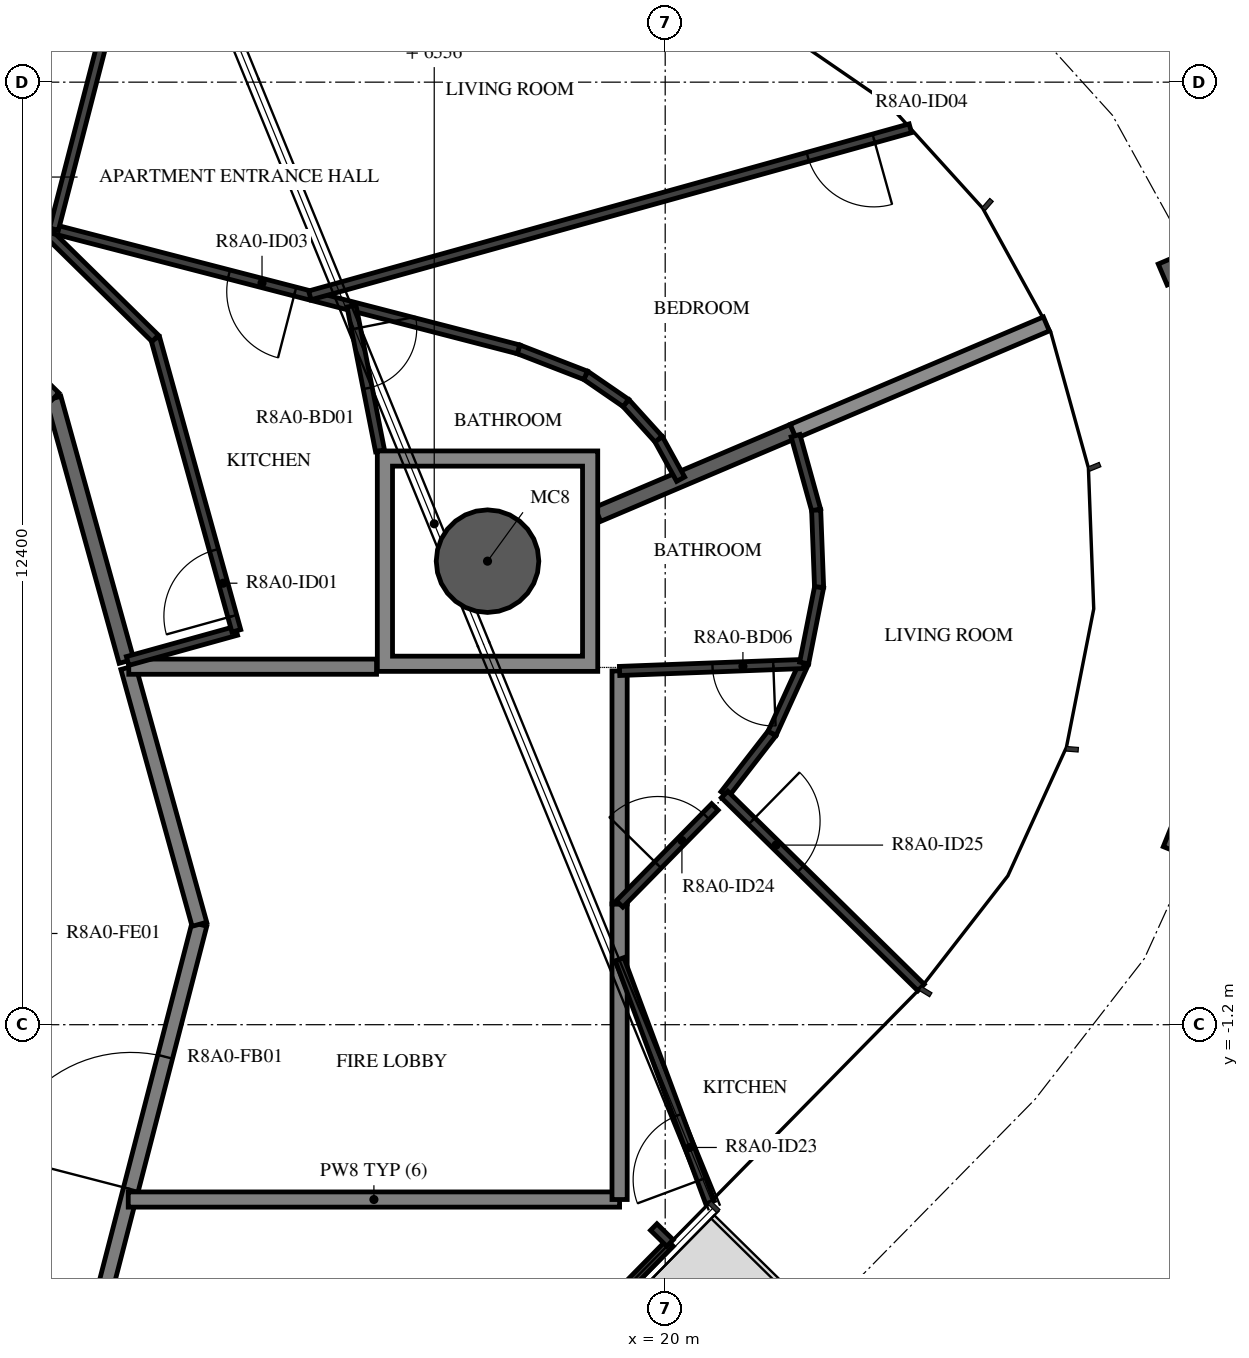
"""IFC4 building model, lengths in metres.
Left out: names, types, materials, properties, quantities, classifications, styles, units other than length and angle.
Written with IfcOpenShell. Run it as: python <this file> out.ifc"""

import sys

from ifc_helpers import new_model, si_unit, direction, frame, frame_2d, origin, origin_2d, place, context, subcontext, project, spatial, polyline, rectangle, hollow_circle, i_section, outline, extrude, element, fill, save


model = new_model("IFC4")
c1 = context("Model", 3, precision=1e-05, world=origin(), true_north=direction((0.0, 1.0)))
c2 = subcontext(c1, "Body", "Model", "MODEL_VIEW")
j1 = project(units=[si_unit("LENGTHUNIT", "METRE"), si_unit("PLANEANGLEUNIT", "RADIAN")], contexts=[c1])
p1 = place(None, origin())
s1 = spatial("IfcSite", under=j1, at=p1, CompositionType="ELEMENT")
p2 = place(p1, origin())
s2 = spatial("IfcBuilding", under=s1, at=p2, CompositionType="ELEMENT")
p3 = place(p2, frame((0.0, 0.0, 305.2)))
s3 = spatial("IfcBuildingStorey", under=s2, at=p3, CompositionType="ELEMENT", Elevation=305.2)
p4 = place(p3, frame((17.663, 4.898, -0.38), z_axis=(0.0, 0.0, 1.0), x_axis=(1.0, 0.0, 0.0)))
e1 = element("IfcColumn", 1, at=p4, inside=s3, PredefinedType="COLUMN", context=c2, shape_type="SweptSolid", body=[
    extrude(hollow_circle(Radius=0.675, WallThickness=0.03, at=origin_2d()), origin(), (0.0, 0.0, 1.0), 3.5),
])
for number, where, z_axis, x_axis in (
    (2, (27.026, 1.113, -0.38), (0.0, 0.0, 1.0), (-0.375, -0.927, 0.0)),
    (3, (26.96, 8.845, -0.38), (0.0, 0.0, 1.0), (0.391, -0.92, 0.0)),
):
    element("IfcColumn", number, at=place(p3, frame(where, z_axis=z_axis, x_axis=x_axis)), inside=s3, PredefinedType="COLUMN", context=c2, shape_type="SweptSolid", body=[
        extrude(i_section(OverallWidth=0.3, OverallDepth=0.9, WebThickness=0.019, FlangeThickness=0.035, FilletRadius=0.03, at=origin_2d()), origin(), (0.0, 0.0, 1.0), 3.5),
    ])
p5 = place(p3, frame((12.074, -6.831, 0.0), z_axis=(0.0, 0.0, 1.0), x_axis=(0.250391063186, 0.968144780225, 0.0)))
e4 = element("IfcWall", 4, at=p5, inside=s3, PredefinedType="STANDARD", context=c2, shape_type="SweptSolid", body=[
    extrude(rectangle(XDim=7.181, YDim=0.2, at=frame_2d((3.591, 0.0))), origin(), (0.0, 0.0, 1.0), 3.12),
])
p6 = place(p5, frame((3.581, 0.0, 0.0)))
e5 = element("IfcOpeningElement", 5, at=p6, cuts=e4, PredefinedType="OPENING", context=c2, shape_type="SweptSolid", body=[
    extrude(rectangle(XDim=1.8, YDim=2.1, at=frame_2d((0.9, 1.05))), frame((0.0, 0.11, 0.0), z_axis=(0.0, -1.0, 0.0), x_axis=(1.0, 0.0, 0.0)), (0.0, 0.0, 1.0), 0.22),
])
p7 = place(p3, frame((13.872, 0.121, 0.0), z_axis=(0.0, 0.0, 1.0), x_axis=(-0.267291928416, 0.963615600228, 0.0)))
e6 = element("IfcWall", 6, at=p7, inside=s3, PredefinedType="STANDARD", context=c2, shape_type="SweptSolid", body=[
    extrude(rectangle(XDim=3.507, YDim=0.2, at=frame_2d((1.753, 0.0))), origin(), (0.0, 0.0, 1.0), 3.12),
])
p8 = place(p3, frame((12.913, 3.581, 0.0), z_axis=(0.0, 0.0, 1.0), x_axis=(-0.267223005422, 0.963634715737, 0.0)))
e7 = element("IfcWall", 7, at=p8, inside=s3, PredefinedType="STANDARD", context=c2, shape_type="SweptSolid", body=[
    extrude(rectangle(XDim=3.591, YDim=0.2, at=frame_2d((1.795, 0.0))), origin(), (0.0, 0.0, 1.0), 3.12),
])
p9 = place(p3, frame((11.953, 7.041, 0.0), z_axis=(0.0, 0.0, 1.0), x_axis=(-0.713250549143, 0.70090916255, 0.0)))
e8 = element("IfcWall", 8, at=p9, inside=s3, PredefinedType="STANDARD", context=c2, shape_type="SweptSolid", body=[
    extrude(rectangle(XDim=7.181, YDim=0.2, at=frame_2d((3.59, 0.0))), origin(), (0.0, 0.0, 1.0), 3.12),
])
p10 = place(p9, frame((2.6, 0.0, 0.0)))
e9 = element("IfcOpeningElement", 9, at=p10, cuts=e8, PredefinedType="OPENING", context=c2, shape_type="SweptSolid", body=[
    extrude(rectangle(XDim=1.0, YDim=2.1, at=frame_2d((0.5, 1.05))), frame((0.0, 0.11, 0.0), z_axis=(0.0, -1.0, 0.0), x_axis=(1.0, 0.0, 0.0)), (0.0, 0.0, 1.0), 0.22),
])
p11 = place(p3, frame((16.203, 3.51, 0.0), z_axis=(0.0, 0.0, 1.0), x_axis=(-1.0, 0.0, 0.0)))
e10 = element("IfcWall", 10, at=p11, inside=s3, PredefinedType="STANDARD", context=c2, shape_type="SweptSolid", body=[
    extrude(rectangle(XDim=3.26, YDim=0.2, at=frame_2d((1.63, 0.0))), origin(), (0.0, 0.0, 1.0), 3.12),
])
p12 = place(p3, frame((12.936, -3.5, 0.0), z_axis=(0.0, 0.0, 1.0), x_axis=(1.0, 0.0, 0.0)))
e11 = element("IfcWall", 11, at=p12, inside=s3, PredefinedType="STANDARD", context=c2, shape_type="SweptSolid", body=[
    extrude(rectangle(XDim=6.464, YDim=0.2, at=frame_2d((3.232, 0.0))), origin(), (0.0, 0.0, 1.0), 3.12),
])
p13 = place(p3, frame((19.4, -3.5, 0.0), z_axis=(0.0, 0.0, 1.0), x_axis=(0.0, 1.0, 0.0)))
e12 = element("IfcWall", 12, at=p13, inside=s3, PredefinedType="STANDARD", context=c2, shape_type="SweptSolid", body=[
    extrude(rectangle(XDim=3.889, YDim=0.2, at=frame_2d((1.944, 0.0))), origin(), (0.0, 0.0, 1.0), 3.12),
])
p14 = place(p3, frame((19.4, 0.389, 0.0), z_axis=(0.0, 0.0, 1.0), x_axis=(0.0, 1.0, 0.0)))
e13 = element("IfcWall", 13, at=p14, inside=s3, PredefinedType="STANDARD", context=c2, shape_type="SweptSolid", body=[
    extrude(rectangle(XDim=3.065, YDim=0.2, at=frame_2d((1.533, 0.0))), origin(), (0.0, 0.0, 1.0), 3.12),
])
p15 = place(p3, frame((19.113, 5.514, 0.0), z_axis=(0.0, 0.0, 1.0), x_axis=(0.92047794988, 0.390794503268, 0.0)))
e14 = element("IfcWall", 14, at=p15, inside=s3, PredefinedType="STANDARD", context=c2, shape_type="SweptSolid", body=[
    extrude(rectangle(XDim=2.793, YDim=0.2, at=frame_2d((1.396, 0.0))), origin(), (0.0, 0.0, 1.0), 3.12),
])
p16 = place(p3, frame((21.684, 6.605, 0.0), z_axis=(0.0, 0.0, 1.0), x_axis=(0.920517820403, 0.390700578859, 0.0)))
e15 = element("IfcWall", 15, at=p16, inside=s3, PredefinedType="STANDARD", context=c2, shape_type="SweptSolid", body=[
    extrude(rectangle(XDim=3.619, YDim=0.2, at=frame_2d((1.809, 0.0))), origin(), (0.0, 0.0, 1.0), 2.73),
])
p17 = place(p3, frame((12.927, 3.585, 0.0), z_axis=(0.0, 0.0, 1.0), x_axis=(0.963616756608, 0.26728775951, 0.0)))
e16 = element("IfcWall", 16, at=p17, inside=s3, PredefinedType="PARTITIONING", context=c2, shape_type="SweptSolid", body=[
    extrude(rectangle(XDim=1.485, YDim=0.12, at=frame_2d((0.743, 0.0))), origin(), (0.0, 0.0, 1.0), 3.12),
])
p18 = place(p3, frame((14.358, 3.982, 0.0), z_axis=(0.0, 0.0, 1.0), x_axis=(-0.267233823916, 0.963631715623, 0.0)))
e17 = element("IfcWall", 17, at=p18, inside=s3, PredefinedType="PARTITIONING", context=c2, shape_type="SweptSolid", body=[
    extrude(rectangle(XDim=3.992, YDim=0.12, at=frame_2d((1.996, 0.0))), origin(), (0.0, 0.0, 1.0), 3.12),
])
p19 = place(p18, frame((0.2, 0.0, 0.0)))
e18 = element("IfcOpeningElement", 18, at=p19, cuts=e17, PredefinedType="OPENING", context=c2, shape_type="SweptSolid", body=[
    extrude(rectangle(XDim=0.9, YDim=2.1, at=frame_2d((0.45, 1.05))), frame((0.0, 0.07, 0.0), z_axis=(0.0, -1.0, 0.0), x_axis=(1.0, 0.0, 0.0)), (0.0, 0.0, 1.0), 0.14),
])
p20 = place(p3, frame((13.291, 7.829, 0.0), z_axis=(0.0, 0.0, 1.0), x_axis=(-0.713255978622, 0.700903637428, 0.0)))
e19 = element("IfcWall", 19, at=p20, inside=s3, PredefinedType="PARTITIONING", context=c2, shape_type="SweptSolid", body=[
    extrude(rectangle(XDim=7.985, YDim=0.12, at=frame_2d((3.992, 0.0))), origin(), (0.0, 0.0, 1.0), 3.12),
])
p21 = place(p20, frame((2.314, 0.0, 0.0)))
e20 = element("IfcOpeningElement", 20, at=p21, cuts=e19, PredefinedType="OPENING", context=c2, shape_type="SweptSolid", body=[
    extrude(rectangle(XDim=0.9, YDim=2.1, at=frame_2d((0.45, 1.05))), frame((0.0, 0.07, 0.0), z_axis=(0.0, -1.0, 0.0), x_axis=(1.0, 0.0, 0.0)), (0.0, 0.0, 1.0), 0.14),
])
p22 = place(p3, frame((20.203, 5.977, 0.0), z_axis=(0.0, 0.0, 1.0), x_axis=(-0.482261544721, 0.876027284098, 0.0)))
e21 = element("IfcWall", 21, at=p22, inside=s3, PredefinedType="PARTITIONING", context=c2, shape_type="SweptSolid", body=[
    extrude(rectangle(XDim=0.601, YDim=0.12, at=frame_2d((0.301, 0.0))), origin(), (0.0, 0.0, 1.0), 3.12),
])
for number, where, z_axis, x_axis in (
    (22, (19.913, 6.504, 0.0), (0.0, 0.0, 1.0), (-0.671, 0.741, 0.0)),
    (23, (19.482, 6.979, 0.0), (0.0, 0.0, 1.0), (-0.824, 0.566, 0.0)),
):
    element("IfcWall", number, at=place(p3, frame(where, z_axis=z_axis, x_axis=x_axis)), inside=s3, PredefinedType="PARTITIONING", context=c2, shape_type="SweptSolid", body=[
        extrude(rectangle(XDim=0.642, YDim=0.12, at=frame_2d((0.321, 0.0))), origin(), (0.0, 0.0, 1.0), 3.12),
    ])
p23 = place(p3, frame((18.953, 7.343, 0.0), z_axis=(0.0, 0.0, 1.0), x_axis=(-0.932458839957, 0.361276226433, 0.0)))
e24 = element("IfcWall", 24, at=p23, inside=s3, PredefinedType="PARTITIONING", context=c2, shape_type="SweptSolid", body=[
    extrude(rectangle(XDim=0.947, YDim=0.12, at=frame_2d((0.473, 0.0))), origin(), (0.0, 0.0, 1.0), 3.12),
])
p24 = place(p3, frame((18.071, 7.685, 0.0), z_axis=(0.0, 0.0, 1.0), x_axis=(-0.968152245082, 0.250362198309, 0.0)))
e25 = element("IfcWall", 25, at=p24, inside=s3, PredefinedType="PARTITIONING", context=c2, shape_type="SweptSolid", body=[
    extrude(rectangle(XDim=6.313, YDim=0.12, at=frame_2d((3.157, 0.0))), origin(), (0.0, 0.0, 1.0), 3.12),
])
p25 = place(p24, frame((3.036, 0.0, 0.0)))
e26 = element("IfcOpeningElement", 26, at=p25, cuts=e25, PredefinedType="OPENING", context=c2, shape_type="SweptSolid", body=[
    extrude(rectangle(XDim=0.9, YDim=2.1, at=frame_2d((0.45, 1.05))), frame((0.0, 0.07, 0.0), z_axis=(0.0, -1.0, 0.0), x_axis=(1.0, 0.0, 0.0)), (0.0, 0.0, 1.0), 0.14),
])
p26 = place(p3, frame((15.873, 8.253, 0.0), z_axis=(0.0, 0.0, 1.0), x_axis=(0.19340687816, -0.981118636802, 0.0)))
e27 = element("IfcWall", 27, at=p26, inside=s3, PredefinedType="PARTITIONING", context=c2, shape_type="SweptSolid", body=[
    extrude(rectangle(XDim=1.941, YDim=0.12, at=frame_2d((0.971, 0.0))), origin(), (0.0, 0.0, 1.0), 3.12),
])
p27 = place(p26, frame((0.3, 0.0, 0.0)))
e28 = element("IfcOpeningElement", 28, at=p27, cuts=e27, PredefinedType="OPENING", context=c2, shape_type="SweptSolid", body=[
    extrude(rectangle(XDim=0.8, YDim=2.1, at=frame_2d((0.4, 1.05))), frame((0.0, 0.07, 0.0), z_axis=(0.0, -1.0, 0.0), x_axis=(1.0, 0.0, 0.0)), (0.0, 0.0, 1.0), 0.14),
])
p28 = place(p3, frame((23.225, 10.593, 0.0), z_axis=(0.0, 0.0, 1.0), x_axis=(-0.963409492722, -0.268033858559, 0.0)))
e29 = element("IfcWall", 29, at=p28, inside=s3, PredefinedType="PARTITIONING", context=c2, shape_type="SweptSolid", body=[
    extrude(rectangle(XDim=8.2, YDim=0.12, at=frame_2d((4.1, 0.0))), origin(), (0.0, 0.0, 1.0), 3.12),
])
p29 = place(p28, frame((0.5, 0.0, 0.0)))
e30 = element("IfcOpeningElement", 30, at=p29, cuts=e29, PredefinedType="OPENING", context=c2, shape_type="SweptSolid", body=[
    extrude(rectangle(XDim=0.9, YDim=2.1, at=frame_2d((0.45, 1.05))), frame((0.0, 0.07, 0.0), z_axis=(0.0, -1.0, 0.0), x_axis=(1.0, 0.0, 0.0)), (0.0, 0.0, 1.0), 0.14),
])
p30 = place(p3, frame((13.26, 14.3, 0.0), z_axis=(0.0, 0.0, 1.0), x_axis=(-0.25038206324, -0.968147107834, 0.0)))
e31 = element("IfcWall", 31, at=p30, inside=s3, PredefinedType="PARTITIONING", context=c2, shape_type="SweptSolid", body=[
    extrude(rectangle(XDim=5.2, YDim=0.12, at=frame_2d((2.6, 0.0))), origin(), (0.0, 0.0, 1.0), 2.73),
])
p31 = place(p3, frame((19.18, -4.971, 0.0), z_axis=(0.0, 0.0, 1.0), x_axis=(0.700974030867, 0.713186797445, 0.0)))
e32 = element("IfcWall", 32, at=p31, inside=s3, PredefinedType="PARTITIONING", context=c2, shape_type="SweptSolid", body=[
    extrude(rectangle(XDim=1.26, YDim=0.12, at=frame_2d((0.63, 0.0))), origin(), (0.0, 0.0, 1.0), 3.12),
])
p32 = place(p3, frame((20.59, -3.537, 0.0), z_axis=(0.0, 0.0, 1.0), x_axis=(-0.348621180513, 0.937263715556, 0.0)))
e33 = element("IfcWall", 33, at=p32, inside=s3, PredefinedType="PARTITIONING", context=c2, shape_type="SweptSolid", body=[
    extrude(rectangle(XDim=3.413, YDim=0.12, at=frame_2d((1.706, 0.0))), origin(), (0.0, 0.0, 1.0), 3.12),
])
p33 = place(p32, frame((0.32, 0.0, 0.0)))
e34 = element("IfcOpeningElement", 34, at=p33, cuts=e33, PredefinedType="OPENING", context=c2, shape_type="SweptSolid", body=[
    extrude(rectangle(XDim=0.9, YDim=2.1, at=frame_2d((0.45, 1.05))), frame((0.0, 0.07, 0.0), z_axis=(0.0, -1.0, 0.0), x_axis=(1.0, 0.0, 0.0)), (0.0, 0.0, 1.0), 0.14),
])
p34 = place(p3, frame((20.781, 1.829, 0.0), z_axis=(0.0, 0.0, 1.0), x_axis=(0.613326972183, 0.789829111386, 0.0)))
e35 = element("IfcWall", 35, at=p34, inside=s3, PredefinedType="PARTITIONING", context=c2, shape_type="SweptSolid", body=[
    extrude(rectangle(XDim=1.02, YDim=0.12, at=frame_2d((0.51, 0.0))), origin(), (0.0, 0.0, 1.0), 3.12),
])
p35 = place(p3, frame((21.406, 2.634, 0.0), z_axis=(0.0, 0.0, 1.0), x_axis=(0.414726005229, 0.909946339399, 0.0)))
e36 = element("IfcWall", 36, at=p35, inside=s3, PredefinedType="PARTITIONING", context=c2, shape_type="SweptSolid", body=[
    extrude(rectangle(XDim=1.016, YDim=0.12, at=frame_2d((0.508, 0.0))), origin(), (0.0, 0.0, 1.0), 3.12),
])
p36 = place(p3, frame((21.822, 3.545, 0.0), z_axis=(0.0, 0.0, 1.0), x_axis=(-0.999286397149, -0.037771635816, 0.0)))
e37 = element("IfcWall", 37, at=p36, inside=s3, PredefinedType="PARTITIONING", context=c2, shape_type="SweptSolid", body=[
    extrude(rectangle(XDim=2.424, YDim=0.12, at=frame_2d((1.212, 0.0))), origin(), (0.0, 0.0, 1.0), 3.12),
])
p37 = place(p36, frame((0.4, 0.0, 0.0)))
e38 = element("IfcOpeningElement", 38, at=p37, cuts=e37, PredefinedType="OPENING", context=c2, shape_type="SweptSolid", body=[
    extrude(rectangle(XDim=0.8, YDim=2.1, at=frame_2d((0.4, 1.05))), frame((0.0, 0.07, 0.0), z_axis=(0.0, -1.0, 0.0), x_axis=(1.0, 0.0, 0.0)), (0.0, 0.0, 1.0), 0.14),
])
p38 = place(p3, frame((19.4, 0.389, 0.0), z_axis=(0.0, 0.0, 1.0), x_axis=(0.700870484553, 0.713288555833, 0.0)))
e39 = element("IfcWall", 39, at=p38, inside=s3, PredefinedType="PARTITIONING", context=c2, shape_type="SweptSolid", body=[
    extrude(rectangle(XDim=1.789, YDim=0.12, at=frame_2d((0.895, 0.0))), origin(), (0.0, 0.0, 1.0), 3.12),
])
p39 = place(p38, frame((0.72, 0.0, 0.0)))
e40 = element("IfcOpeningElement", 40, at=p39, cuts=e39, PredefinedType="OPENING", context=c2, shape_type="SweptSolid", body=[
    extrude(rectangle(XDim=0.9, YDim=2.1, at=frame_2d((0.45, 1.05))), frame((0.0, 0.07, 0.0), z_axis=(0.0, -1.0, 0.0), x_axis=(1.0, 0.0, 0.0)), (0.0, 0.0, 1.0), 0.14),
])
for number, where, z_axis, x_axis in (
    (41, (21.715, 6.549, 0.0), (0.0, 0.0, 1.0), (0.267, -0.964, 0.0)),
    (42, (21.986, 5.57, 0.0), (0.0, 0.0, 1.0), (0.038, -0.999, 0.0)),
    (43, (22.025, 4.555, 0.0), (0.0, 0.0, 1.0), (-0.194, -0.981, 0.0)),
):
    element("IfcWall", number, at=place(p3, frame(where, z_axis=z_axis, x_axis=x_axis)), inside=s3, PredefinedType="PARTITIONING", context=c2, shape_type="SweptSolid", body=[
        extrude(rectangle(XDim=1.016, YDim=0.12, at=frame_2d((0.508, 0.0))), origin(), (0.0, 0.0, 1.0), 3.12),
    ])
p40 = place(p3, frame((20.781, 1.829, 0.0), z_axis=(0.0, 0.0, 1.0), x_axis=(0.713277344744, -0.700881894099, 0.0)))
e44 = element("IfcWall", 44, at=p40, inside=s3, PredefinedType="PARTITIONING", context=c2, shape_type="SweptSolid", body=[
    extrude(rectangle(XDim=3.624, YDim=0.12, at=frame_2d((1.812, 0.0))), origin(), (0.0, 0.0, 1.0), 3.12),
])
p41 = place(p40, frame((0.5, 0.0, 0.0)))
e45 = element("IfcOpeningElement", 45, at=p41, cuts=e44, PredefinedType="OPENING", context=c2, shape_type="SweptSolid", body=[
    extrude(rectangle(XDim=0.9, YDim=2.1, at=frame_2d((0.45, 1.05))), frame((0.0, 0.07, 0.0), z_axis=(0.0, -1.0, 0.0), x_axis=(1.0, 0.0, 0.0)), (0.0, 0.0, 1.0), 0.14),
])
p42 = place(p3, frame((20.063, -4.073, 0.0), z_axis=(0.0, 0.0, 1.0), x_axis=(-0.7135861572, 0.700567481584, 0.0)))
e46 = element("IfcWall", 46, at=p42, inside=s3, PredefinedType="PARTITIONING", context=c2, shape_type="SweptSolid", body=[
    extrude(rectangle(XDim=0.3, YDim=0.12, at=frame_2d((0.15, 0.0))), origin(), (0.0, 0.0, 1.0), 3.12),
])
p43 = place(p3, origin())
e47 = element("IfcWall", 47, at=p43, inside=s3, PredefinedType="STANDARD", context=c2, shape_type="SweptSolid", body=[
    extrude(outline(polyline([(19.113, 6.348), (19.113, 3.448), (16.213, 3.448), (16.213, 6.348), (19.113, 6.348)]), holes=[polyline([(16.413, 3.648), (18.913, 3.648), (18.913, 6.148), (16.413, 6.148), (16.413, 3.648)])]), origin(), (0.0, 0.0, 1.0), 3.12),
])
p44 = place(p19, origin())
e48 = element("IfcDoor", 48, at=p44, inside=s3, OperationType="SINGLE_SWING_LEFT", PredefinedType="DOOR", context=c2, shape_type="SweptSolid", body=[
    extrude(rectangle(XDim=0.9, YDim=2.1, at=frame_2d((0.45, 1.05))), frame((0.0, 0.025, 0.0), z_axis=(0.0, -1.0, 0.0), x_axis=(1.0, 0.0, 0.0)), (0.0, 0.0, 1.0), 0.05),
])
fill(e18, e48)
p45 = place(p27, origin())
e49 = element("IfcDoor", 49, at=p45, inside=s3, OperationType="SINGLE_SWING_LEFT", PredefinedType="DOOR", context=c2, shape_type="SweptSolid", body=[
    extrude(rectangle(XDim=0.8, YDim=2.1, at=frame_2d((0.4, 1.05))), frame((0.0, 0.025, 0.0), z_axis=(0.0, -1.0, 0.0), x_axis=(1.0, 0.0, 0.0)), (0.0, 0.0, 1.0), 0.05),
])
fill(e28, e49)
p46 = place(p25, origin())
e50 = element("IfcDoor", 50, at=p46, inside=s3, OperationType="SINGLE_SWING_LEFT", PredefinedType="DOOR", context=c2, shape_type="SweptSolid", body=[
    extrude(rectangle(XDim=0.9, YDim=2.1, at=frame_2d((0.45, 1.05))), frame((0.0, 0.025, 0.0), z_axis=(0.0, -1.0, 0.0), x_axis=(1.0, 0.0, 0.0)), (0.0, 0.0, 1.0), 0.05),
])
fill(e26, e50)
p47 = place(p29, origin())
e51 = element("IfcDoor", 51, at=p47, inside=s3, OperationType="SINGLE_SWING_LEFT", PredefinedType="DOOR", context=c2, shape_type="SweptSolid", body=[
    extrude(rectangle(XDim=0.9, YDim=2.1, at=frame_2d((0.45, 1.05))), frame((0.0, 0.025, 0.0), z_axis=(0.0, -1.0, 0.0), x_axis=(1.0, 0.0, 0.0)), (0.0, 0.0, 1.0), 0.05),
])
fill(e30, e51)
p48 = place(p33, origin())
e52 = element("IfcDoor", 52, at=p48, inside=s3, OperationType="SINGLE_SWING_RIGHT", PredefinedType="DOOR", context=c2, shape_type="SweptSolid", body=[
    extrude(rectangle(XDim=0.9, YDim=2.1, at=frame_2d((0.45, 1.05))), frame((0.0, 0.025, 0.0), z_axis=(0.0, -1.0, 0.0), x_axis=(1.0, 0.0, 0.0)), (0.0, 0.0, 1.0), 0.05),
])
fill(e34, e52)
p49 = place(p39, origin())
e53 = element("IfcDoor", 53, at=p49, inside=s3, OperationType="SINGLE_SWING_LEFT", PredefinedType="DOOR", context=c2, shape_type="SweptSolid", body=[
    extrude(rectangle(XDim=0.9, YDim=2.1, at=frame_2d((0.45, 1.05))), frame((0.0, 0.025, 0.0), z_axis=(0.0, -1.0, 0.0), x_axis=(1.0, 0.0, 0.0)), (0.0, 0.0, 1.0), 0.05),
])
fill(e40, e53)
p50 = place(p37, origin())
e54 = element("IfcDoor", 54, at=p50, inside=s3, OperationType="SINGLE_SWING_RIGHT", PredefinedType="DOOR", context=c2, shape_type="SweptSolid", body=[
    extrude(rectangle(XDim=0.8, YDim=2.1, at=frame_2d((0.4, 1.05))), frame((0.0, 0.025, 0.0), z_axis=(0.0, -1.0, 0.0), x_axis=(1.0, 0.0, 0.0)), (0.0, 0.0, 1.0), 0.05),
])
fill(e38, e54)
p51 = place(p41, origin())
e55 = element("IfcDoor", 55, at=p51, inside=s3, OperationType="SINGLE_SWING_RIGHT", PredefinedType="DOOR", context=c2, shape_type="SweptSolid", body=[
    extrude(rectangle(XDim=0.9, YDim=2.1, at=frame_2d((0.45, 1.05))), frame((0.0, 0.025, 0.0), z_axis=(0.0, -1.0, 0.0), x_axis=(1.0, 0.0, 0.0)), (0.0, 0.0, 1.0), 0.05),
])
fill(e45, e55)
p52 = place(p6, origin())
e56 = element("IfcDoor", 56, at=p52, inside=s3, OperationType="DOUBLE_DOOR_SINGLE_SWING", PredefinedType="DOOR", context=c2, shape_type="SweptSolid", body=[
    extrude(rectangle(XDim=1.8, YDim=2.1, at=frame_2d((0.9, 1.05))), frame((0.0, 0.025, 0.0), z_axis=(0.0, -1.0, 0.0), x_axis=(1.0, 0.0, 0.0)), (0.0, 0.0, 1.0), 0.05),
])
fill(e5, e56)
save(model, sys.argv[1])
